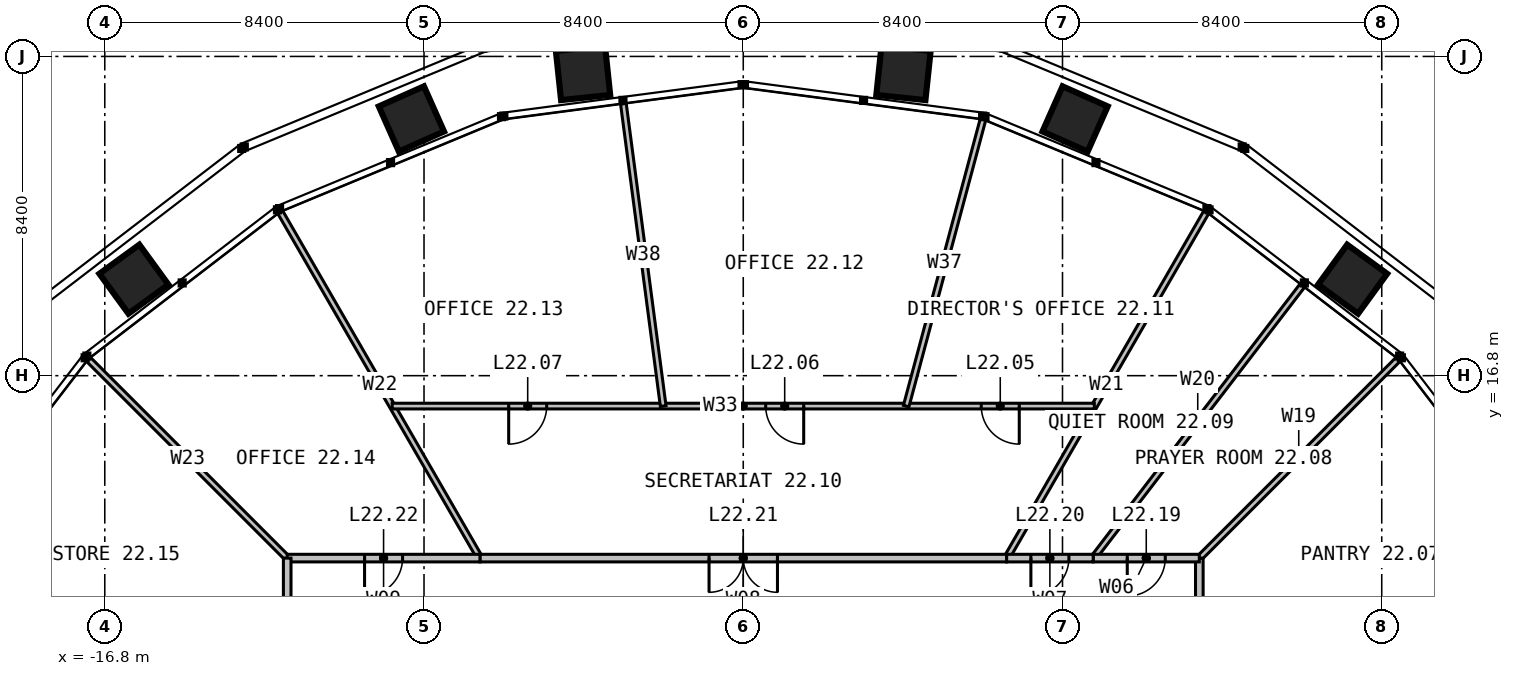
"""IFC4 building model, lengths in metres.
Left out: names, types, materials, properties, quantities, classifications, styles, units other than length and angle.
Written with IfcOpenShell. Run it as: python <this file> out.ifc"""

import sys

from ifc_helpers import new_model, si_unit, direction, frame, frame_2d, origin, place, context, subcontext, project, spatial, rectangle, extrude, element, fill, save


model = new_model("IFC4")
c1 = context("Model", 3, precision=1e-05, world=origin(), true_north=direction((0.0, 1.0)))
c2 = subcontext(c1, "Body", "Model", "MODEL_VIEW")
j1 = project(units=[si_unit("LENGTHUNIT", "METRE"), si_unit("PLANEANGLEUNIT", "RADIAN")], contexts=[c1])
p1 = place(None, origin())
s1 = spatial("IfcSite", under=j1, at=p1, CompositionType="ELEMENT")
p2 = place(p1, origin())
s2 = spatial("IfcBuilding", under=s1, at=p2, CompositionType="ELEMENT")
p3 = place(p2, frame((0.0, 0.0, 94.0)))
s3 = spatial("IfcBuildingStorey", under=s2, at=p3, CompositionType="ELEMENT", Elevation=94.0)
p4 = place(p3, frame((12.0, 6.928, 0.0), z_axis=(0.0, 0.0, 1.0), x_axis=(0.866028201971, 0.499995153367, 0.0)))
e1 = element("IfcWall", 1, at=p4, inside=s3, PredefinedType="PARTITIONING", context=c2, shape_type="SweptSolid", body=[
    extrude(rectangle(XDim=10.514, YDim=0.15, at=frame_2d((5.257, 0.0))), origin(), (0.0, 0.0, 1.0), 2.79),
])
p5 = place(p3, frame((12.0, 12.0, 0.0), z_axis=(0.0, 0.0, 1.0), x_axis=(0.707106781187, 0.707106781187, 0.0)))
e2 = element("IfcWall", 2, at=p5, inside=s3, PredefinedType="PARTITIONING", context=c2, shape_type="SweptSolid", body=[
    extrude(rectangle(XDim=7.4, YDim=0.15, at=frame_2d((3.7, 0.0))), origin(), (0.0, 0.0, 1.0), 2.79),
])
p6 = place(p3, frame((9.208, 12.0, 0.0), z_axis=(0.0, 0.0, 1.0), x_axis=(0.60876104896, 0.793353631913, 0.0)))
e3 = element("IfcWall", 3, at=p6, inside=s3, PredefinedType="PARTITIONING", context=c2, shape_type="SweptSolid", body=[
    extrude(rectangle(XDim=9.036, YDim=0.15, at=frame_2d((4.518, 0.0))), origin(), (0.0, 0.0, 1.0), 2.79),
])
for number, where, z_axis, x_axis in (
    (4, (6.928, 12.0, 0.0), (0.0, 0.0, 1.0), (0.5, 0.866, 0.0)),
    (5, (-6.928, 12.0, 0.0), (0.0, 0.0, 1.0), (-0.5, 0.866, 0.0)),
):
    element("IfcWall", number, at=place(p3, frame(where, z_axis=z_axis, x_axis=x_axis)), inside=s3, PredefinedType="PARTITIONING", context=c2, shape_type="SweptSolid", body=[
        extrude(rectangle(XDim=10.514, YDim=0.15, at=frame_2d((5.257, 0.0))), origin(), (0.0, 0.0, 1.0), 2.79),
    ])
p7 = place(p3, frame((-12.0, 12.0, 0.0), z_axis=(0.0, 0.0, 1.0), x_axis=(-0.707106781187, 0.707106781187, 0.0)))
e6 = element("IfcWall", 6, at=p7, inside=s3, PredefinedType="PARTITIONING", context=c2, shape_type="SweptSolid", body=[
    extrude(rectangle(XDim=7.4, YDim=0.15, at=frame_2d((3.7, 0.0))), origin(), (0.0, 0.0, 1.0), 2.79),
])
p8 = place(p3, frame((-12.0, 6.928, 0.0), z_axis=(0.0, 0.0, 1.0), x_axis=(-0.866028201971, 0.499995153367, 0.0)))
e7 = element("IfcWall", 7, at=p8, inside=s3, PredefinedType="PARTITIONING", context=c2, shape_type="SweptSolid", body=[
    extrude(rectangle(XDim=10.514, YDim=0.15, at=frame_2d((5.257, 0.0))), origin(), (0.0, 0.0, 1.0), 2.79),
])
p9 = place(p3, frame((12.0, 6.928, 0.0), z_axis=(0.0, 0.0, 1.0), x_axis=(0.0, 1.0, 0.0)))
e8 = element("IfcWall", 8, at=p9, inside=s3, PredefinedType="PARTITIONING", context=c2, shape_type="SweptSolid", body=[
    extrude(rectangle(XDim=5.072, YDim=0.2, at=frame_2d((2.536, 0.0))), origin(), (0.0, 0.0, 1.0), 3.8),
])
p10 = place(p9, frame((2.036, 0.0, 0.0)))
e9 = element("IfcOpeningElement", 9, at=p10, cuts=e8, PredefinedType="OPENING", context=c2, shape_type="SweptSolid", body=[
    extrude(rectangle(XDim=1.0, YDim=2.2, at=frame_2d((0.5, 1.1))), frame((0.0, 0.11, 0.0), z_axis=(0.0, -1.0, 0.0), x_axis=(1.0, 0.0, 0.0)), (0.0, 0.0, 1.0), 0.22),
])
p11 = place(p3, frame((12.0, 12.0, 0.0), z_axis=(0.0, 0.0, 1.0), x_axis=(-1.0, 0.0, 0.0)))
e10 = element("IfcWall", 10, at=p11, inside=s3, PredefinedType="PARTITIONING", context=c2, shape_type="SweptSolid", body=[
    extrude(rectangle(XDim=2.792, YDim=0.2, at=frame_2d((1.396, 0.0))), origin(), (0.0, 0.0, 1.0), 3.8),
])
p12 = place(p11, frame((0.896, 0.0, 0.0)))
e11 = element("IfcOpeningElement", 11, at=p12, cuts=e10, PredefinedType="OPENING", context=c2, shape_type="SweptSolid", body=[
    extrude(rectangle(XDim=1.0, YDim=2.2, at=frame_2d((0.5, 1.1))), frame((0.0, 0.11, 0.0), z_axis=(0.0, -1.0, 0.0), x_axis=(1.0, 0.0, 0.0)), (0.0, 0.0, 1.0), 0.22),
])
p13 = place(p3, frame((9.208, 12.0, 0.0), z_axis=(0.0, 0.0, 1.0), x_axis=(-1.0, 0.0, 0.0)))
e12 = element("IfcWall", 12, at=p13, inside=s3, PredefinedType="PARTITIONING", context=c2, shape_type="SweptSolid", body=[
    extrude(rectangle(XDim=2.28, YDim=0.2, at=frame_2d((1.14, 0.0))), origin(), (0.0, 0.0, 1.0), 3.8),
])
p14 = place(p13, frame((0.64, 0.0, 0.0)))
e13 = element("IfcOpeningElement", 13, at=p14, cuts=e12, PredefinedType="OPENING", context=c2, shape_type="SweptSolid", body=[
    extrude(rectangle(XDim=1.0, YDim=2.2, at=frame_2d((0.5, 1.1))), frame((0.0, 0.11, 0.0), z_axis=(0.0, -1.0, 0.0), x_axis=(1.0, 0.0, 0.0)), (0.0, 0.0, 1.0), 0.22),
])
p15 = place(p3, frame((9.238, 16.0, 0.0), z_axis=(0.0, 0.0, 1.0), x_axis=(-1.0, 0.0, 0.0)))
e14 = element("IfcWall", 14, at=p15, inside=s3, PredefinedType="PARTITIONING", context=c2, shape_type="SweptSolid", body=[
    extrude(rectangle(XDim=18.475, YDim=0.15, at=frame_2d((9.238, 0.0))), origin(), (0.0, 0.0, 1.0), 2.79),
])
p16 = place(p15, frame((1.975, 0.0, 0.0)))
e15 = element("IfcOpeningElement", 15, at=p16, cuts=e14, PredefinedType="OPENING", context=c2, shape_type="SweptSolid", body=[
    extrude(rectangle(XDim=1.0, YDim=2.2, at=frame_2d((0.5, 1.1))), frame((0.0, 0.085, 0.0), z_axis=(0.0, -1.0, 0.0), x_axis=(1.0, 0.0, 0.0)), (0.0, 0.0, 1.0), 0.17),
])
p17 = place(p15, frame((7.647, 0.0, 0.0)))
e16 = element("IfcOpeningElement", 16, at=p17, cuts=e14, PredefinedType="OPENING", context=c2, shape_type="SweptSolid", body=[
    extrude(rectangle(XDim=1.0, YDim=2.2, at=frame_2d((0.5, 1.1))), frame((0.0, 0.085, 0.0), z_axis=(0.0, -1.0, 0.0), x_axis=(1.0, 0.0, 0.0)), (0.0, 0.0, 1.0), 0.17),
])
p18 = place(p15, frame((14.41, 0.0, 0.0)))
e17 = element("IfcOpeningElement", 17, at=p18, cuts=e14, PredefinedType="OPENING", context=c2, shape_type="SweptSolid", body=[
    extrude(rectangle(XDim=1.0, YDim=2.2, at=frame_2d((0.5, 1.1))), frame((0.0, 0.085, 0.0), z_axis=(0.0, -1.0, 0.0), x_axis=(1.0, 0.0, 0.0)), (0.0, 0.0, 1.0), 0.17),
])
p19 = place(p3, frame((4.287, 16.0, 0.0), z_axis=(0.0, 0.0, 1.0), x_axis=(0.258816859097, 0.965926412025, 0.0)))
e18 = element("IfcWall", 18, at=p19, inside=s3, PredefinedType="PARTITIONING", context=c2, shape_type="SweptSolid", body=[
    extrude(rectangle(XDim=7.806, YDim=0.15, at=frame_2d((3.903, 0.0))), origin(), (0.0, 0.0, 1.0), 2.79),
])
p20 = place(p3, frame((-2.106, 16.0, 0.0), z_axis=(0.0, 0.0, 1.0), x_axis=(-0.130533221372, 0.991443935943, 0.0)))
e19 = element("IfcWall", 19, at=p20, inside=s3, PredefinedType="PARTITIONING", context=c2, shape_type="SweptSolid", body=[
    extrude(rectangle(XDim=8.024, YDim=0.15, at=frame_2d((4.012, 0.0))), origin(), (0.0, 0.0, 1.0), 2.79),
])
p21 = place(p3, frame((6.928, 12.0, 0.0), z_axis=(0.0, 0.0, 1.0), x_axis=(-1.0, 0.0, 0.0)))
e20 = element("IfcWall", 20, at=p21, inside=s3, PredefinedType="PARTITIONING", context=c2, shape_type="SweptSolid", body=[
    extrude(rectangle(XDim=13.856, YDim=0.2, at=frame_2d((6.928, 0.0))), origin(), (0.0, 0.0, 1.0), 3.8),
])
p22 = place(p21, frame((6.028, 0.0, 0.0)))
e21 = element("IfcOpeningElement", 21, at=p22, cuts=e20, PredefinedType="OPENING", context=c2, shape_type="SweptSolid", body=[
    extrude(rectangle(XDim=1.8, YDim=2.2, at=frame_2d((0.9, 1.1))), frame((0.0, 0.11, 0.0), z_axis=(0.0, -1.0, 0.0), x_axis=(1.0, 0.0, 0.0)), (0.0, 0.0, 1.0), 0.22),
])
p23 = place(p3, frame((-6.928, 12.0, 0.0), z_axis=(0.0, 0.0, 1.0), x_axis=(-1.0, 0.0, 0.0)))
e22 = element("IfcWall", 22, at=p23, inside=s3, PredefinedType="PARTITIONING", context=c2, shape_type="SweptSolid", body=[
    extrude(rectangle(XDim=5.072, YDim=0.2, at=frame_2d((2.536, 0.0))), origin(), (0.0, 0.0, 1.0), 3.8),
])
p24 = place(p23, frame((2.036, 0.0, 0.0)))
e23 = element("IfcOpeningElement", 23, at=p24, cuts=e22, PredefinedType="OPENING", context=c2, shape_type="SweptSolid", body=[
    extrude(rectangle(XDim=1.0, YDim=2.2, at=frame_2d((0.5, 1.1))), frame((0.0, 0.11, 0.0), z_axis=(0.0, -1.0, 0.0), x_axis=(1.0, 0.0, 0.0)), (0.0, 0.0, 1.0), 0.22),
])
p25 = place(p3, frame((-12.0, 12.0, 0.0), z_axis=(0.0, 0.0, 1.0), x_axis=(0.0, -1.0, 0.0)))
e24 = element("IfcWall", 24, at=p25, inside=s3, PredefinedType="PARTITIONING", context=c2, shape_type="SweptSolid", body=[
    extrude(rectangle(XDim=5.072, YDim=0.2, at=frame_2d((2.536, 0.0))), origin(), (0.0, 0.0, 1.0), 3.8),
])
p26 = place(p25, frame((2.036, 0.0, 0.0)))
e25 = element("IfcOpeningElement", 25, at=p26, cuts=e24, PredefinedType="OPENING", context=c2, shape_type="SweptSolid", body=[
    extrude(rectangle(XDim=1.0, YDim=2.2, at=frame_2d((0.5, 1.1))), frame((0.0, 0.11, 0.0), z_axis=(0.0, -1.0, 0.0), x_axis=(1.0, 0.0, 0.0)), (0.0, 0.0, 1.0), 0.22),
])
p27 = place(p12, origin())
e26 = element("IfcDoor", 26, at=p27, inside=s3, OperationType="SINGLE_SWING_RIGHT", PredefinedType="DOOR", context=c2, shape_type="SweptSolid", body=[
    extrude(rectangle(XDim=1.0, YDim=2.2, at=frame_2d((0.5, 1.1))), frame((0.0, 0.025, 0.0), z_axis=(0.0, -1.0, 0.0), x_axis=(1.0, 0.0, 0.0)), (0.0, 0.0, 1.0), 0.05),
])
fill(e11, e26)
p28 = place(p14, origin())
e27 = element("IfcDoor", 27, at=p28, inside=s3, OperationType="SINGLE_SWING_RIGHT", PredefinedType="DOOR", context=c2, shape_type="SweptSolid", body=[
    extrude(rectangle(XDim=1.0, YDim=2.2, at=frame_2d((0.5, 1.1))), frame((0.0, 0.025, 0.0), z_axis=(0.0, -1.0, 0.0), x_axis=(1.0, 0.0, 0.0)), (0.0, 0.0, 1.0), 0.05),
])
fill(e13, e27)
p29 = place(p16, origin())
e28 = element("IfcDoor", 28, at=p29, inside=s3, OperationType="SINGLE_SWING_LEFT", PredefinedType="DOOR", context=c2, shape_type="SweptSolid", body=[
    extrude(rectangle(XDim=1.0, YDim=2.2, at=frame_2d((0.5, 1.1))), frame((0.0, 0.025, 0.0), z_axis=(0.0, -1.0, 0.0), x_axis=(1.0, 0.0, 0.0)), (0.0, 0.0, 1.0), 0.05),
])
fill(e15, e28)
p30 = place(p17, origin())
e29 = element("IfcDoor", 29, at=p30, inside=s3, OperationType="SINGLE_SWING_LEFT", PredefinedType="DOOR", context=c2, shape_type="SweptSolid", body=[
    extrude(rectangle(XDim=1.0, YDim=2.2, at=frame_2d((0.5, 1.1))), frame((0.0, 0.025, 0.0), z_axis=(0.0, -1.0, 0.0), x_axis=(1.0, 0.0, 0.0)), (0.0, 0.0, 1.0), 0.05),
])
fill(e16, e29)
p31 = place(p18, origin())
e30 = element("IfcDoor", 30, at=p31, inside=s3, OperationType="SINGLE_SWING_RIGHT", PredefinedType="DOOR", context=c2, shape_type="SweptSolid", body=[
    extrude(rectangle(XDim=1.0, YDim=2.2, at=frame_2d((0.5, 1.1))), frame((0.0, 0.025, 0.0), z_axis=(0.0, -1.0, 0.0), x_axis=(1.0, 0.0, 0.0)), (0.0, 0.0, 1.0), 0.05),
])
fill(e17, e30)
p32 = place(p22, origin())
e31 = element("IfcDoor", 31, at=p32, inside=s3, OperationType="DOUBLE_DOOR_SINGLE_SWING", PredefinedType="DOOR", context=c2, shape_type="SweptSolid", body=[
    extrude(rectangle(XDim=1.8, YDim=2.2, at=frame_2d((0.9, 1.1))), frame((0.0, 0.025, 0.0), z_axis=(0.0, -1.0, 0.0), x_axis=(1.0, 0.0, 0.0)), (0.0, 0.0, 1.0), 0.05),
])
fill(e21, e31)
p33 = place(p24, origin())
e32 = element("IfcDoor", 32, at=p33, inside=s3, OperationType="SINGLE_SWING_RIGHT", PredefinedType="DOOR", context=c2, shape_type="SweptSolid", body=[
    extrude(rectangle(XDim=1.0, YDim=2.2, at=frame_2d((0.5, 1.1))), frame((0.0, 0.025, 0.0), z_axis=(0.0, -1.0, 0.0), x_axis=(1.0, 0.0, 0.0)), (0.0, 0.0, 1.0), 0.05),
])
fill(e23, e32)
save(model, sys.argv[1])
